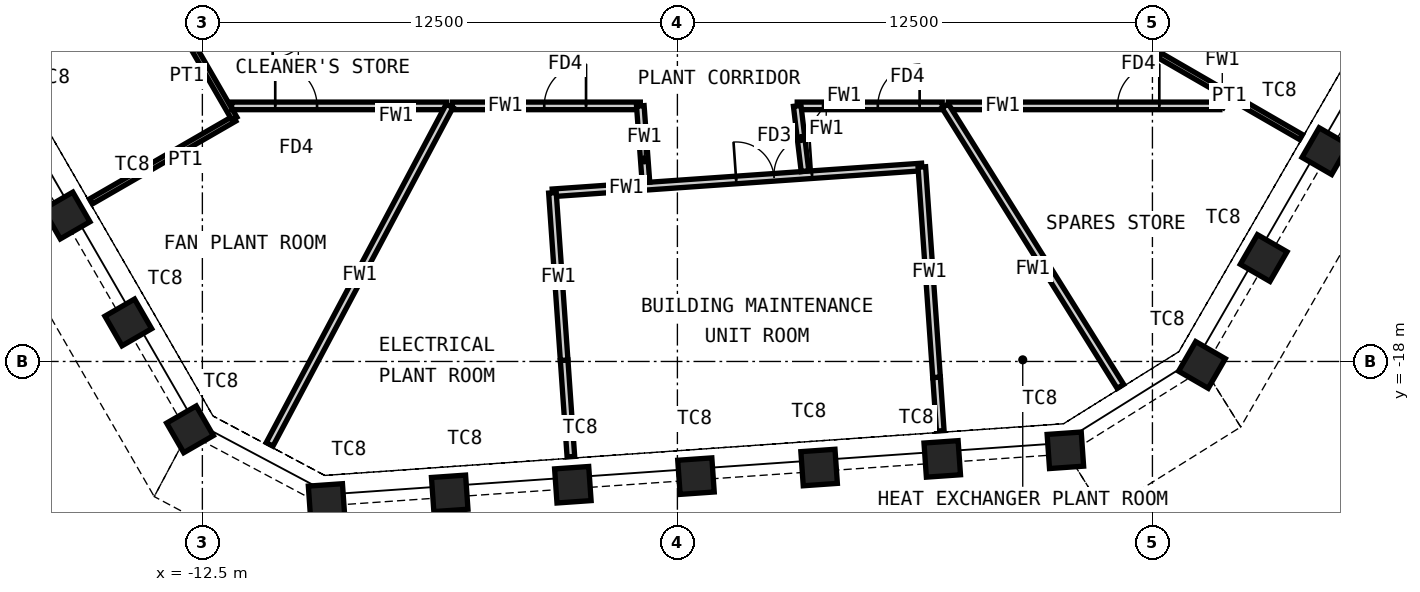
"""IFC4 building model, lengths in metres.
Left out: names, types, materials, properties, quantities, classifications, styles, units other than length and angle.
Written with IfcOpenShell. Run it as: python <this file> out.ifc"""

import sys

from ifc_helpers import new_model, si_unit, direction, frame, frame_2d, origin, origin_2d, place, context, subcontext, project, spatial, rectangle, hollow_rectangle, extrude, element, fill, save


model = new_model("IFC4")
c1 = context("Model", 3, precision=1e-05, world=origin(), true_north=direction((0.0, 1.0)))
c2 = subcontext(c1, "Body", "Model", "MODEL_VIEW")
j1 = project(units=[si_unit("LENGTHUNIT", "METRE"), si_unit("PLANEANGLEUNIT", "RADIAN")], contexts=[c1])
p1 = place(None, origin())
s1 = spatial("IfcSite", under=j1, at=p1, CompositionType="ELEMENT")
p2 = place(p1, origin())
s2 = spatial("IfcBuilding", under=s1, at=p2, CompositionType="ELEMENT")
p3 = place(p2, frame((0.0, 0.0, 337.6)))
s3 = spatial("IfcBuildingStorey", under=s2, at=p3, CompositionType="ELEMENT", Elevation=337.6)
for number, where, z_axis, x_axis in (
    (1, (17.052, -12.466, 0.0), (0.0, 0.0, 1.0), (0.5, 0.866, 0.0)),
    (2, (15.427, -15.279, 0.0), (0.0, 0.0, 1.0), (0.5, 0.866, 0.0)),
    (3, (13.803, -18.092, 0.0), (0.0, 0.0, 1.0), (0.5, 0.866, 0.0)),
    (4, (10.209, -20.337, 0.0), (0.0, 0.0, 1.0), (0.998, 0.07, 0.0)),
    (5, (6.969, -20.564, 0.0), (0.0, 0.0, 1.0), (0.998, 0.07, 0.0)),
    (6, (3.729, -20.791, 0.0), (0.0, 0.0, 1.0), (0.998, 0.07, 0.0)),
    (7, (0.489, -21.017, 0.0), (0.0, 0.0, 1.0), (0.998, 0.07, 0.0)),
    (8, (-2.751, -21.244, 0.0), (0.0, 0.0, 1.0), (0.998, 0.07, 0.0)),
    (9, (-5.991, -21.47, 0.0), (0.0, 0.0, 1.0), (0.998, 0.07, 0.0)),
    (10, (-9.231, -21.697, 0.0), (0.0, 0.0, 1.0), (0.998, 0.07, 0.0)),
    (11, (-12.825, -19.786, 0.0), (0.0, 0.0, 1.0), (0.5, -0.866, 0.0)),
    (12, (-14.449, -16.973, 0.0), (0.0, 0.0, 1.0), (0.5, -0.866, 0.0)),
    (13, (-16.073, -14.16, 0.0), (0.0, 0.0, 1.0), (0.5, -0.866, 0.0)),
):
    element("IfcColumn", number, at=place(p3, frame(where, z_axis=z_axis, x_axis=x_axis)), inside=s3, PredefinedType="COLUMN", context=c2, shape_type="SweptSolid", body=[
        extrude(hollow_rectangle(XDim=0.9, YDim=0.9, WallThickness=0.05, at=origin_2d()), origin(), (0.0, 0.0, 1.0), 6.0),
    ])
p4 = place(p3, frame((6.918, -19.826, 0.0), z_axis=(0.0, 0.0, 1.0), x_axis=(-0.069722385129, 0.997566433383, 0.0)))
e14 = element("IfcWall", 14, at=p4, inside=s3, PredefinedType="PARTITIONING", context=c2, shape_type="SweptSolid", body=[
    extrude(rectangle(XDim=1.411, YDim=0.2, at=frame_2d((0.706, 0.0))), origin(), (0.0, 0.0, 1.0), 4.85),
])
p5 = place(p3, frame((-2.803, -20.505, 0.0), z_axis=(0.0, 0.0, 1.0), x_axis=(-0.069753698722, 0.997564244304, 0.0)))
e15 = element("IfcWall", 15, at=p5, inside=s3, PredefinedType="PARTITIONING", context=c2, shape_type="SweptSolid", body=[
    extrude(rectangle(XDim=2.544, YDim=0.2, at=frame_2d((1.272, 0.0))), origin(), (0.0, 0.0, 1.0), 4.65),
])
p6 = place(p3, frame((6.432, -12.883, 0.0), z_axis=(0.0, 0.0, 1.0), x_axis=(-0.99756416549, -0.069754825858, 0.0)))
e16 = element("IfcWall", 16, at=p6, inside=s3, PredefinedType="PARTITIONING", context=c2, shape_type="SweptSolid", body=[
    extrude(rectangle(XDim=9.744, YDim=0.2, at=frame_2d((4.872, 0.0))), origin(), (0.0, 0.0, 1.0), 5.75),
])
p7 = place(p6, frame((2.898, 0.0, 0.0)))
e17 = element("IfcOpeningElement", 17, at=p7, cuts=e16, PredefinedType="OPENING", context=c2, shape_type="SweptSolid", body=[
    extrude(rectangle(XDim=2.0, YDim=2.4, at=frame_2d((1.0, 1.2))), frame((0.0, 0.11, 0.0), z_axis=(0.0, -1.0, 0.0), x_axis=(1.0, 0.0, 0.0)), (0.0, 0.0, 1.0), 0.22),
])
p8 = place(p3, frame((16.411, -12.096, 0.0), z_axis=(0.0, 0.0, 1.0), x_axis=(-0.866032659912, 0.499987431809, 0.0)))
e18 = element("IfcWall", 18, at=p8, inside=s3, PredefinedType="PARTITIONING", context=c2, shape_type="SweptSolid", body=[
    extrude(rectangle(XDim=4.36, YDim=0.15, at=frame_2d((2.18, 0.0))), origin(), (0.0, 0.0, 1.0), 4.85),
])
p9 = place(p3, frame((15.883, -4.29, 0.0), z_axis=(0.0, 0.0, 1.0), x_axis=(-0.500003318956, -0.866023487576, 0.0)))
e19 = element("IfcWall", 19, at=p9, inside=s3, PredefinedType="PARTITIONING", context=c2, shape_type="SweptSolid", body=[
    extrude(rectangle(XDim=6.496, YDim=0.15, at=frame_2d((3.248, 0.0))), origin(), (0.0, 0.0, 1.0), 5.75),
])
p10 = place(p9, frame((2.348, 0.0, 0.0)))
e20 = element("IfcOpeningElement", 20, at=p10, cuts=e19, PredefinedType="OPENING", context=c2, shape_type="SweptSolid", body=[
    extrude(rectangle(XDim=1.8, YDim=2.4, at=frame_2d((0.9, 1.2))), frame((0.0, 0.085, 0.0), z_axis=(0.0, -1.0, 0.0), x_axis=(1.0, 0.0, 0.0)), (0.0, 0.0, 1.0), 0.17),
])
p11 = place(p3, frame((-15.433, -13.79, 0.0), z_axis=(0.0, 0.0, 1.0), x_axis=(0.866032659912, 0.499987431809, 0.0)))
e21 = element("IfcWall", 21, at=p11, inside=s3, PredefinedType="PARTITIONING", context=c2, shape_type="SweptSolid", body=[
    extrude(rectangle(XDim=4.36, YDim=0.15, at=frame_2d((2.18, 0.0))), origin(), (0.0, 0.0, 1.0), 4.65),
])
p12 = place(p3, frame((-11.657, -11.61, 0.0), z_axis=(0.0, 0.0, 1.0), x_axis=(-0.500003318956, 0.866023487576, 0.0)))
e22 = element("IfcWall", 22, at=p12, inside=s3, PredefinedType="PARTITIONING", context=c2, shape_type="SweptSolid", body=[
    extrude(rectangle(XDim=6.496, YDim=0.15, at=frame_2d((3.248, 0.0))), origin(), (0.0, 0.0, 1.0), 5.75),
])
p13 = place(p12, frame((4.297, 0.0, 0.0)))
e23 = element("IfcOpeningElement", 23, at=p13, cuts=e22, PredefinedType="OPENING", context=c2, shape_type="SweptSolid", body=[
    extrude(rectangle(XDim=1.8, YDim=2.4, at=frame_2d((0.9, 1.2))), frame((0.0, 0.085, 0.0), z_axis=(0.0, -1.0, 0.0), x_axis=(1.0, 0.0, 0.0)), (0.0, 0.0, 1.0), 0.17),
])
p14 = place(p3, frame((-6.074, -11.275, 0.0), z_axis=(0.0, 0.0, 1.0), x_axis=(-1.0, 0.0, 0.0)))
e24 = element("IfcWall", 24, at=p14, inside=s3, PredefinedType="PARTITIONING", context=c2, shape_type="SweptSolid", body=[
    extrude(rectangle(XDim=5.655, YDim=0.2, at=frame_2d((2.827, 0.0))), origin(), (0.0, 0.0, 1.0), 5.75),
])
p15 = place(p14, frame((3.408, 0.0, 0.0)))
e25 = element("IfcOpeningElement", 25, at=p15, cuts=e24, PredefinedType="OPENING", context=c2, shape_type="SweptSolid", body=[
    extrude(rectangle(XDim=1.1, YDim=2.1, at=frame_2d((0.55, 1.05))), frame((0.0, 0.11, 0.0), z_axis=(0.0, -1.0, 0.0), x_axis=(1.0, 0.0, 0.0)), (0.0, 0.0, 1.0), 0.22),
])
p16 = place(p3, frame((-0.976, -11.275, 0.0), z_axis=(0.0, 0.0, 1.0), x_axis=(-1.0, 0.0, 0.0)))
e26 = element("IfcWall", 26, at=p16, inside=s3, PredefinedType="PARTITIONING", context=c2, shape_type="SweptSolid", body=[
    extrude(rectangle(XDim=4.946, YDim=0.2, at=frame_2d((2.473, 0.0))), origin(), (0.0, 0.0, 1.0), 5.75),
])
p17 = place(p16, frame((1.428, 0.0, 0.0)))
e27 = element("IfcOpeningElement", 27, at=p17, cuts=e26, PredefinedType="OPENING", context=c2, shape_type="SweptSolid", body=[
    extrude(rectangle(XDim=1.1, YDim=2.1, at=frame_2d((0.55, 1.05))), frame((0.0, 0.11, 0.0), z_axis=(0.0, -1.0, 0.0), x_axis=(1.0, 0.0, 0.0)), (0.0, 0.0, 1.0), 0.22),
])
p18 = place(p3, frame((-0.828, -13.285, 0.0), z_axis=(0.0, 0.0, 1.0), x_axis=(-0.073346553246, 0.99730651413, 0.0)))
e28 = element("IfcWall", 28, at=p18, inside=s3, PredefinedType="PARTITIONING", context=c2, shape_type="SweptSolid", body=[
    extrude(rectangle(XDim=1.182, YDim=0.2, at=frame_2d((0.591, 0.0))), origin(), (0.0, 0.0, 1.0), 4.85),
])
p19 = place(p3, frame((6.969, -11.275, 0.0), z_axis=(0.0, 0.0, 1.0), x_axis=(-1.0, 0.0, 0.0)))
e29 = element("IfcWall", 29, at=p19, inside=s3, PredefinedType="PARTITIONING", context=c2, shape_type="SweptSolid", body=[
    extrude(rectangle(XDim=3.816, YDim=0.2, at=frame_2d((1.908, 0.0))), origin(), (0.0, 0.0, 1.0), 5.75),
])
p20 = place(p19, frame((0.595, 0.0, 0.0)))
e30 = element("IfcOpeningElement", 30, at=p20, cuts=e29, PredefinedType="OPENING", context=c2, shape_type="SweptSolid", body=[
    extrude(rectangle(XDim=1.1, YDim=2.1, at=frame_2d((0.55, 1.05))), frame((0.0, 0.11, 0.0), z_axis=(0.0, -1.0, 0.0), x_axis=(1.0, 0.0, 0.0)), (0.0, 0.0, 1.0), 0.22),
])
p21 = place(p3, frame((3.153, -11.275, 0.0), z_axis=(0.0, 0.0, 1.0), x_axis=(0.118143300288, -0.992996556186, 0.0)))
e31 = element("IfcWall", 31, at=p21, inside=s3, PredefinedType="PARTITIONING", context=c2, shape_type="SweptSolid", body=[
    extrude(rectangle(XDim=1.73, YDim=0.2, at=frame_2d((0.865, 0.0))), origin(), (0.0, 0.0, 1.0), 4.85),
])
p22 = place(p3, frame((14.275, -11.275, 0.0), z_axis=(0.0, 0.0, 1.0), x_axis=(-1.0, 0.0, 0.0)))
e32 = element("IfcWall", 32, at=p22, inside=s3, PredefinedType="PARTITIONING", context=c2, shape_type="SweptSolid", body=[
    extrude(rectangle(XDim=7.146, YDim=0.2, at=frame_2d((3.573, 0.0))), origin(), (0.0, 0.0, 1.0), 5.75),
])
p23 = place(p22, frame((1.594, 0.0, 0.0)))
e33 = element("IfcOpeningElement", 33, at=p23, cuts=e32, PredefinedType="OPENING", context=c2, shape_type="SweptSolid", body=[
    extrude(rectangle(XDim=1.1, YDim=2.1, at=frame_2d((0.55, 1.05))), frame((0.0, 0.11, 0.0), z_axis=(0.0, -1.0, 0.0), x_axis=(1.0, 0.0, 0.0)), (0.0, 0.0, 1.0), 0.22),
])
p24 = place(p3, frame((14.275, -11.275, 0.0), z_axis=(0.0, 0.0, 1.0), x_axis=(0.500616342655, 0.865669265636, 0.0)))
e34 = element("IfcWall", 34, at=p24, inside=s3, PredefinedType="PARTITIONING", context=c2, shape_type="SweptSolid", body=[
    extrude(rectangle(XDim=0.252, YDim=0.2, at=frame_2d((0.126, 0.0))), origin(), (0.0, 0.0, 1.0), 5.75),
])
p25 = place(p3, frame((7.045, -11.275, 0.0), z_axis=(0.0, 0.0, 1.0), x_axis=(0.529913212647, -0.848051877577, 0.0)))
e35 = element("IfcWall", 35, at=p25, inside=s3, PredefinedType="PARTITIONING", context=c2, shape_type="SweptSolid", body=[
    extrude(rectangle(XDim=8.704, YDim=0.2, at=frame_2d((4.352, 0.0))), origin(), (0.0, 0.0, 1.0), 5.75),
])
p26 = place(p3, frame((-5.995, -11.275, 0.0), z_axis=(0.0, 0.0, 1.0), x_axis=(-0.4694648611, -0.882951156176, 0.0)))
e36 = element("IfcWall", 36, at=p26, inside=s3, PredefinedType="PARTITIONING", context=c2, shape_type="SweptSolid", body=[
    extrude(rectangle(XDim=10.088, YDim=0.2, at=frame_2d((5.044, 0.0))), origin(), (0.0, 0.0, 1.0), 5.75),
])
p27 = place(p3, frame((6.819, -18.418, 0.0), z_axis=(0.0, 0.0, 1.0), x_axis=(-0.069783591025, 0.997562153664, 0.0)))
e37 = element("IfcWall", 37, at=p27, inside=s3, PredefinedType="PARTITIONING", context=c2, shape_type="SweptSolid", body=[
    extrude(rectangle(XDim=5.549, YDim=0.2, at=frame_2d((2.774, 0.0))), origin(), (0.0, 0.0, 1.0), 5.75),
])
p28 = place(p3, frame((-2.98, -17.967, 0.0), z_axis=(0.0, 0.0, 1.0), x_axis=(-0.069726231003, 0.997566164578, 0.0)))
e38 = element("IfcWall", 38, at=p28, inside=s3, PredefinedType="PARTITIONING", context=c2, shape_type="SweptSolid", body=[
    extrude(rectangle(XDim=4.415, YDim=0.2, at=frame_2d((2.208, 0.0))), origin(), (0.0, 0.0, 1.0), 5.75),
])
p29 = place(p3, frame((-0.915, -12.107, 0.0), z_axis=(0.0, 0.0, 1.0), x_axis=(-0.073181584457, 0.997318632984, 0.0)))
e39 = element("IfcWall", 39, at=p29, inside=s3, PredefinedType="PARTITIONING", context=c2, shape_type="SweptSolid", body=[
    extrude(rectangle(XDim=0.834, YDim=0.2, at=frame_2d((0.417, 0.0))), origin(), (0.0, 0.0, 1.0), 4.65),
])
p30 = place(p7, origin())
e40 = element("IfcDoor", 40, at=p30, inside=s3, OperationType="DOUBLE_DOOR_DOUBLE_SWING", PredefinedType="DOOR", context=c2, shape_type="SweptSolid", body=[
    extrude(rectangle(XDim=2.0, YDim=2.4, at=frame_2d((1.0, 1.2))), frame((0.0, 0.025, 0.0), z_axis=(0.0, -1.0, 0.0), x_axis=(1.0, 0.0, 0.0)), (0.0, 0.0, 1.0), 0.05),
])
fill(e17, e40)
p31 = place(p15, origin())
e41 = element("IfcDoor", 41, at=p31, inside=s3, OperationType="SINGLE_SWING_RIGHT", PredefinedType="DOOR", context=c2, shape_type="SweptSolid", body=[
    extrude(rectangle(XDim=1.1, YDim=2.1, at=frame_2d((0.55, 1.05))), frame((0.0, 0.025, 0.0), z_axis=(0.0, -1.0, 0.0), x_axis=(1.0, 0.0, 0.0)), (0.0, 0.0, 1.0), 0.05),
])
fill(e25, e41)
p32 = place(p17, origin())
e42 = element("IfcDoor", 42, at=p32, inside=s3, OperationType="SINGLE_SWING_LEFT", PredefinedType="DOOR", context=c2, shape_type="SweptSolid", body=[
    extrude(rectangle(XDim=1.1, YDim=2.1, at=frame_2d((0.55, 1.05))), frame((0.0, 0.025, 0.0), z_axis=(0.0, -1.0, 0.0), x_axis=(1.0, 0.0, 0.0)), (0.0, 0.0, 1.0), 0.05),
])
fill(e27, e42)
p33 = place(p20, origin())
e43 = element("IfcDoor", 43, at=p33, inside=s3, OperationType="SINGLE_SWING_LEFT", PredefinedType="DOOR", context=c2, shape_type="SweptSolid", body=[
    extrude(rectangle(XDim=1.1, YDim=2.1, at=frame_2d((0.55, 1.05))), frame((0.0, 0.025, 0.0), z_axis=(0.0, -1.0, 0.0), x_axis=(1.0, 0.0, 0.0)), (0.0, 0.0, 1.0), 0.05),
])
fill(e30, e43)
p34 = place(p23, origin())
e44 = element("IfcDoor", 44, at=p34, inside=s3, OperationType="SINGLE_SWING_LEFT", PredefinedType="DOOR", context=c2, shape_type="SweptSolid", body=[
    extrude(rectangle(XDim=1.1, YDim=2.1, at=frame_2d((0.55, 1.05))), frame((0.0, 0.025, 0.0), z_axis=(0.0, -1.0, 0.0), x_axis=(1.0, 0.0, 0.0)), (0.0, 0.0, 1.0), 0.05),
])
fill(e33, e44)
save(model, sys.argv[1])
